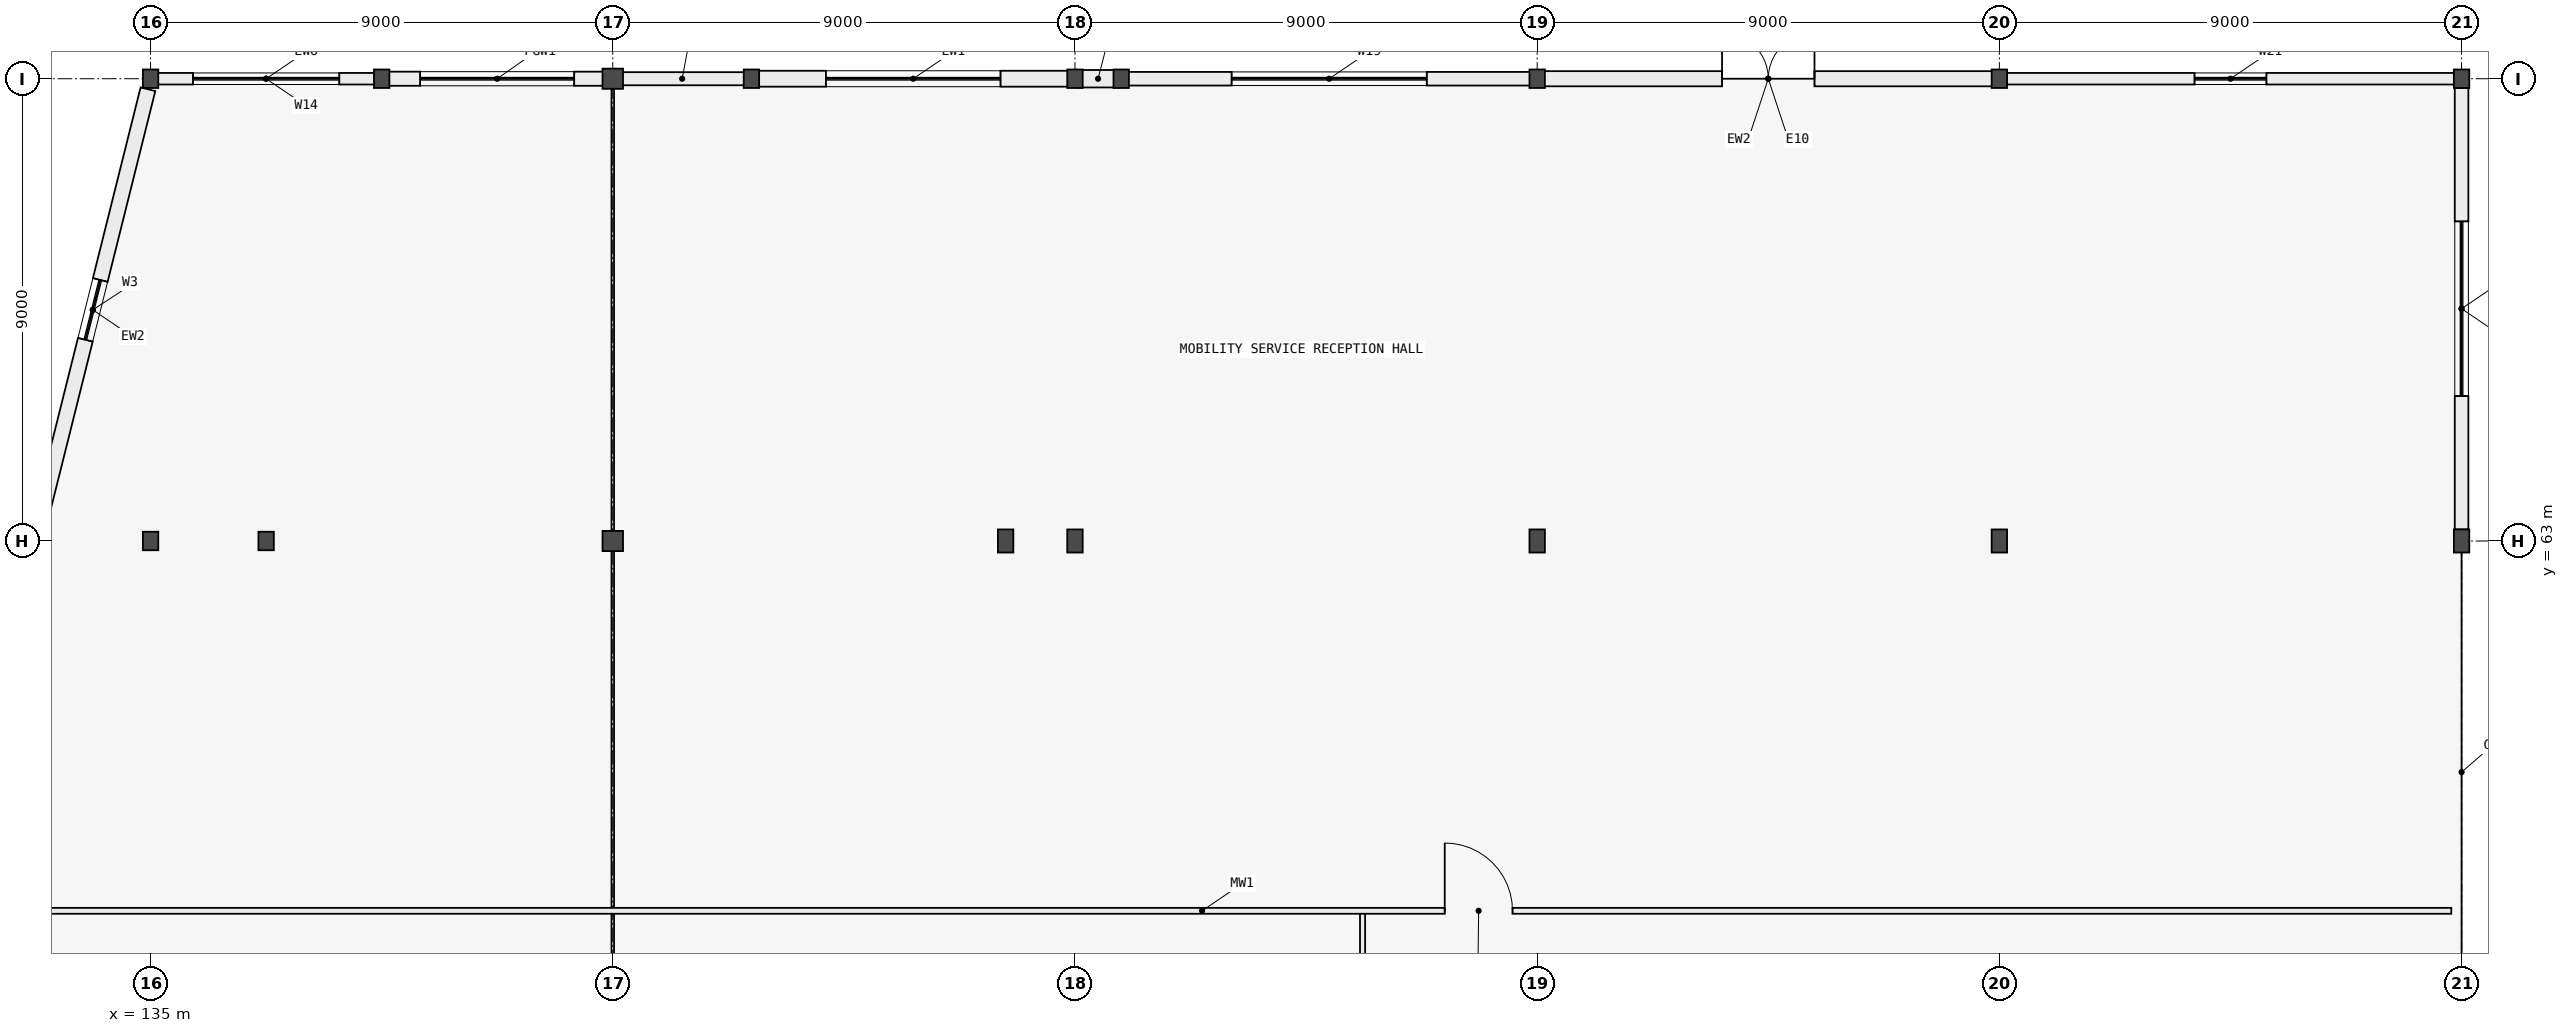
"""IFC4 building model, lengths in metres.
Left out: names, types, materials, properties, quantities, classifications, styles, units other than length and angle.
Written with IfcOpenShell. Run it as: python <this file> out.ifc"""

import sys

from ifc_helpers import new_model, si_unit, direction, frame, frame_2d, origin, origin_2d, place, context, subcontext, project, spatial, rectangle, i_section, extrude, element, fill, save


model = new_model("IFC4")
c1 = context("Model", 3, precision=1e-05, world=origin(), true_north=direction((0.0, 1.0)))
c2 = subcontext(c1, "Body", "Model", "MODEL_VIEW")
j1 = project(units=[si_unit("LENGTHUNIT", "METRE"), si_unit("PLANEANGLEUNIT", "RADIAN")], contexts=[c1])
p1 = place(None, origin())
s1 = spatial("IfcSite", under=j1, at=p1, CompositionType="ELEMENT")
p2 = place(p1, origin())
s2 = spatial("IfcBuilding", under=s1, at=p2, CompositionType="ELEMENT")
p3 = place(p2, origin())
s3 = spatial("IfcBuildingStorey", under=s2, at=p3, CompositionType="ELEMENT", Elevation=0.0)
for number, where, z_axis, x_axis in (
    (1, (135.0, 63.0, 0.0), (0.0, 0.0, 1.0), (1.0, 0.0, 0.0)),
    (2, (137.25, 63.0, 0.0), (0.0, 0.0, 1.0), (1.0, 0.0, 0.0)),
):
    element("IfcColumn", number, at=place(p3, frame(where, z_axis=z_axis, x_axis=x_axis)), inside=s3, PredefinedType="COLUMN", context=c2, shape_type="SweptSolid", body=[
        extrude(i_section(OverallWidth=0.3, OverallDepth=0.36, WebThickness=0.012, FlangeThickness=0.022, FilletRadius=0.027, at=origin_2d()), origin(), (0.0, 0.0, 1.0), 4.2),
    ])
p4 = place(p3, frame((144.0, 63.0, 0.0), z_axis=(0.0, 0.0, 1.0), x_axis=(1.0, 0.0, 0.0)))
e3 = element("IfcColumn", 3, at=p4, inside=s3, PredefinedType="COLUMN", context=c2, shape_type="SweptSolid", body=[
    extrude(i_section(OverallWidth=0.399, OverallDepth=0.393, WebThickness=0.018, FlangeThickness=0.028, FilletRadius=0.015, at=origin_2d()), origin(), (0.0, 0.0, 1.0), 4.2),
])
for number, where, z_axis, x_axis in (
    (4, (151.65, 63.0, 0.0), (0.0, 0.0, 1.0), (1.0, 0.0, 0.0)),
    (5, (153.0, 63.0, 0.0), (0.0, 0.0, 1.0), (1.0, 0.0, 0.0)),
    (6, (162.0, 63.0, 0.0), (0.0, 0.0, 1.0), (1.0, 0.0, 0.0)),
    (7, (171.0, 63.0, 0.0), (0.0, 0.0, 1.0), (1.0, 0.0, 0.0)),
    (8, (180.0, 63.0, 0.0), (0.0, 0.0, 1.0), (1.0, 0.0, 0.0)),
):
    element("IfcColumn", number, at=place(p3, frame(where, z_axis=z_axis, x_axis=x_axis)), inside=s3, PredefinedType="COLUMN", context=c2, shape_type="SweptSolid", body=[
        extrude(i_section(OverallWidth=0.3, OverallDepth=0.45, WebThickness=0.014, FlangeThickness=0.026, FilletRadius=0.027, at=origin_2d()), origin(), (0.0, 0.0, 1.0), 4.2),
    ])
for number, where, z_axis, x_axis in (
    (9, (135.0, 72.0, 0.0), (0.0, 0.0, 1.0), (1.0, 0.0, 0.0)),
    (10, (139.5, 72.0, 0.0), (0.0, 0.0, 1.0), (1.0, 0.0, 0.0)),
):
    element("IfcColumn", number, at=place(p3, frame(where, z_axis=z_axis, x_axis=x_axis)), inside=s3, PredefinedType="COLUMN", context=c2, shape_type="SweptSolid", body=[
        extrude(i_section(OverallWidth=0.3, OverallDepth=0.36, WebThickness=0.012, FlangeThickness=0.022, FilletRadius=0.027, at=origin_2d()), origin(), (0.0, 0.0, 1.0), 4.2),
    ])
p5 = place(p3, frame((144.0, 72.0, 0.0), z_axis=(0.0, 0.0, 1.0), x_axis=(1.0, 0.0, 0.0)))
e11 = element("IfcColumn", 11, at=p5, inside=s3, PredefinedType="COLUMN", context=c2, shape_type="SweptSolid", body=[
    extrude(i_section(OverallWidth=0.399, OverallDepth=0.393, WebThickness=0.018, FlangeThickness=0.028, FilletRadius=0.015, at=origin_2d()), origin(), (0.0, 0.0, 1.0), 4.2),
])
for number, where, z_axis, x_axis in (
    (12, (146.7, 72.0, 0.0), (0.0, 0.0, 1.0), (1.0, 0.0, 0.0)),
    (13, (153.0, 72.0, 0.0), (0.0, 0.0, 1.0), (1.0, 0.0, 0.0)),
    (14, (153.9, 72.0, 0.0), (0.0, 0.0, 1.0), (1.0, 0.0, 0.0)),
    (15, (162.0, 72.0, 0.0), (0.0, 0.0, 1.0), (1.0, 0.0, 0.0)),
    (16, (171.0, 72.0, 0.0), (0.0, 0.0, 1.0), (1.0, 0.0, 0.0)),
    (17, (180.0, 72.0, 0.0), (0.0, 0.0, 1.0), (1.0, 0.0, 0.0)),
):
    element("IfcColumn", number, at=place(p3, frame(where, z_axis=z_axis, x_axis=x_axis)), inside=s3, PredefinedType="COLUMN", context=c2, shape_type="SweptSolid", body=[
        extrude(i_section(OverallWidth=0.3, OverallDepth=0.36, WebThickness=0.012, FlangeThickness=0.022, FilletRadius=0.027, at=origin_2d()), origin(), (0.0, 0.0, 1.0), 4.2),
    ])
p6 = place(p3, frame((180.0, 63.225, 0.0), z_axis=(0.0, 0.0, 1.0), x_axis=(0.0, 1.0, 0.0)))
e18 = element("IfcWall", 18, at=p6, inside=s3, PredefinedType="STANDARD", context=c2, shape_type="SweptSolid", body=[
    extrude(rectangle(XDim=8.595, YDim=0.265, at=frame_2d((4.297, 0.0))), origin(), (0.0, 0.0, 1.0), 3.625),
])
p7 = place(p6, frame((2.597, 0.0, 0.95)))
e19 = element("IfcOpeningElement", 19, at=p7, cuts=e18, PredefinedType="OPENING", context=c2, shape_type="SweptSolid", body=[
    extrude(rectangle(XDim=3.4, YDim=1.55, at=frame_2d((1.7, 0.775))), frame((0.0, 0.143, 0.0), z_axis=(0.0, -1.0, 0.0), x_axis=(1.0, 0.0, 0.0)), (0.0, 0.0, 1.0), 0.285),
])
p8 = place(p3, frame((135.006, 72.0, 0.0), z_axis=(0.0, 0.0, 1.0), x_axis=(1.0, 0.0, 0.0)))
e20 = element("IfcWall", 20, at=p8, inside=s3, PredefinedType="STANDARD", context=c2, shape_type="SweptSolid", body=[
    extrude(rectangle(XDim=4.488, YDim=0.225, at=frame_2d((2.244, 0.0))), origin(), (0.0, 0.0, 1.0), 3.655),
])
p9 = place(p8, frame((0.819, 0.0, 0.95)))
e21 = element("IfcOpeningElement", 21, at=p9, cuts=e20, PredefinedType="OPENING", context=c2, shape_type="SweptSolid", body=[
    extrude(rectangle(XDim=2.85, YDim=1.7, at=frame_2d((1.425, 0.85))), frame((0.0, 0.123, 0.0), z_axis=(0.0, -1.0, 0.0), x_axis=(1.0, 0.0, 0.0)), (0.0, 0.0, 1.0), 0.245),
])
p10 = place(p3, frame((139.506, 72.0, 0.0), z_axis=(0.0, 0.0, 1.0), x_axis=(1.0, 0.0, 0.0)))
e22 = element("IfcWall", 22, at=p10, inside=s3, PredefinedType="POLYGONAL", context=c2, shape_type="SweptSolid", body=[
    extrude(rectangle(XDim=4.485, YDim=0.275, at=frame_2d((2.243, 0.0))), origin(), (0.0, 0.0, 1.0), 3.655),
])
p11 = place(p10, frame((0.742, 0.0, 0.95)))
e23 = element("IfcOpeningElement", 23, at=p11, cuts=e22, PredefinedType="OPENING", context=c2, shape_type="SweptSolid", body=[
    extrude(rectangle(XDim=3.0, YDim=1.8, at=frame_2d((1.5, 0.9))), frame((0.0, 0.147, 0.0), z_axis=(0.0, -1.0, 0.0), x_axis=(1.0, 0.0, 0.0)), (0.0, 0.0, 1.0), 0.295),
])
p12 = place(p3, frame((144.009, 72.0, 0.0), z_axis=(0.0, 0.0, 1.0), x_axis=(1.0, 0.0, 0.0)))
e24 = element("IfcWall", 24, at=p12, inside=s3, PredefinedType="POLYGONAL", context=c2, shape_type="SweptSolid", body=[
    extrude(rectangle(XDim=2.685, YDim=0.255, at=frame_2d((1.342, 0.0))), origin(), (0.0, 0.0, 1.0), 3.655),
])
p13 = place(p3, frame((146.706, 72.0, 0.0), z_axis=(0.0, 0.0, 1.0), x_axis=(1.0, 0.0, 0.0)))
e25 = element("IfcWall", 25, at=p13, inside=s3, PredefinedType="STANDARD", context=c2, shape_type="SweptSolid", body=[
    extrude(rectangle(XDim=6.288, YDim=0.31, at=frame_2d((3.144, 0.0))), origin(), (0.0, 0.0, 1.0), 3.655),
])
p14 = place(p13, frame((1.444, 0.0, 0.95)))
e26 = element("IfcOpeningElement", 26, at=p14, cuts=e25, PredefinedType="OPENING", context=c2, shape_type="SweptSolid", body=[
    extrude(rectangle(XDim=3.4, YDim=1.55, at=frame_2d((1.7, 0.775))), frame((0.0, 0.165, 0.0), z_axis=(0.0, -1.0, 0.0), x_axis=(1.0, 0.0, 0.0)), (0.0, 0.0, 1.0), 0.33),
])
p15 = place(p3, frame((153.006, 72.0, 0.0), z_axis=(0.0, 0.0, 1.0), x_axis=(1.0, 0.0, 0.0)))
e27 = element("IfcWall", 27, at=p15, inside=s3, PredefinedType="STANDARD", context=c2, shape_type="SweptSolid", body=[
    extrude(rectangle(XDim=0.888, YDim=0.34, at=frame_2d((0.444, 0.0))), origin(), (0.0, 0.0, 1.0), 3.655),
])
p16 = place(p3, frame((153.906, 72.0, 0.0), z_axis=(0.0, 0.0, 1.0), x_axis=(1.0, 0.0, 0.0)))
e28 = element("IfcWall", 28, at=p16, inside=s3, PredefinedType="STANDARD", context=c2, shape_type="SweptSolid", body=[
    extrude(rectangle(XDim=8.088, YDim=0.265, at=frame_2d((4.044, 0.0))), origin(), (0.0, 0.0, 1.0), 3.625),
])
p17 = place(p16, frame((2.144, 0.0, 0.95)))
e29 = element("IfcOpeningElement", 29, at=p17, cuts=e28, PredefinedType="OPENING", context=c2, shape_type="SweptSolid", body=[
    extrude(rectangle(XDim=3.8, YDim=1.4, at=frame_2d((1.9, 0.7))), frame((0.0, 0.143, 0.0), z_axis=(0.0, -1.0, 0.0), x_axis=(1.0, 0.0, 0.0)), (0.0, 0.0, 1.0), 0.285),
])
p18 = place(p3, frame((162.006, 72.0, 0.0), z_axis=(0.0, 0.0, 1.0), x_axis=(1.0, 0.0, 0.0)))
e30 = element("IfcWall", 30, at=p18, inside=s3, PredefinedType="STANDARD", context=c2, shape_type="SweptSolid", body=[
    extrude(rectangle(XDim=8.988, YDim=0.295, at=frame_2d((4.494, 0.0))), origin(), (0.0, 0.0, 1.0), 3.625),
])
p19 = place(p18, frame((3.594, 0.0, 0.0)))
e31 = element("IfcOpeningElement", 31, at=p19, cuts=e30, PredefinedType="OPENING", context=c2, shape_type="SweptSolid", body=[
    extrude(rectangle(XDim=1.8, YDim=2.2, at=frame_2d((0.9, 1.1))), frame((0.0, 0.157, 0.0), z_axis=(0.0, -1.0, 0.0), x_axis=(1.0, 0.0, 0.0)), (0.0, 0.0, 1.0), 0.315),
])
p20 = place(p3, frame((171.006, 72.0, 0.0), z_axis=(0.0, 0.0, 1.0), x_axis=(1.0, 0.0, 0.0)))
e32 = element("IfcWall", 32, at=p20, inside=s3, PredefinedType="STANDARD", context=c2, shape_type="SweptSolid", body=[
    extrude(rectangle(XDim=8.988, YDim=0.225, at=frame_2d((4.494, 0.0))), origin(), (0.0, 0.0, 1.0), 3.625),
])
p21 = place(p20, frame((3.794, 0.0, 0.95)))
e33 = element("IfcOpeningElement", 33, at=p21, cuts=e32, PredefinedType="OPENING", context=c2, shape_type="SweptSolid", body=[
    extrude(rectangle(XDim=1.4, YDim=2.0, at=frame_2d((0.7, 1.0))), frame((0.0, 0.123, 0.0), z_axis=(0.0, -1.0, 0.0), x_axis=(1.0, 0.0, 0.0)), (0.0, 0.0, 1.0), 0.245),
])
p22 = place(p3, frame((132.801, 63.205, 0.0), z_axis=(0.0, 0.0, 1.0), x_axis=(0.242509676291, 0.970148986963, 0.0)))
e34 = element("IfcWall", 34, at=p22, inside=s3, PredefinedType="STANDARD", context=c2, shape_type="SweptSolid", body=[
    extrude(rectangle(XDim=8.855, YDim=0.295, at=frame_2d((4.428, 0.0))), origin(), (0.0, 0.0, 1.0), 3.325),
])
p23 = place(p22, frame((3.827, 0.0, 0.95)))
e35 = element("IfcOpeningElement", 35, at=p23, cuts=e34, PredefinedType="OPENING", context=c2, shape_type="SweptSolid", body=[
    extrude(rectangle(XDim=1.2, YDim=1.35, at=frame_2d((0.6, 0.675))), frame((0.0, 0.157, 0.0), z_axis=(0.0, -1.0, 0.0), x_axis=(1.0, 0.0, 0.0)), (0.0, 0.0, 1.0), 0.315),
])
p24 = place(p3, frame((158.6, 36.2, 0.0), z_axis=(0.0, 0.0, 1.0), x_axis=(0.0, 1.0, 0.0)))
e36 = element("IfcWall", 36, at=p24, inside=s3, PredefinedType="PARTITIONING", context=c2, shape_type="SweptSolid", body=[
    extrude(rectangle(XDim=19.6, YDim=0.1, at=frame_2d((9.8, 0.0))), origin(), (0.0, 0.0, 1.0), 3.655),
])
p25 = place(p24, frame((9.2, 0.0, 0.0)))
e37 = element("IfcOpeningElement", 37, at=p25, cuts=e36, PredefinedType="OPENING", context=c2, shape_type="SweptSolid", body=[
    extrude(rectangle(XDim=1.22, YDim=2.18, at=frame_2d((0.61, 1.09))), frame((0.0, 0.06, 0.0), z_axis=(0.0, -1.0, 0.0), x_axis=(1.0, 0.0, 0.0)), (0.0, 0.0, 1.0), 0.12),
])
p26 = place(p3, frame((131.15, 55.8, 0.0), z_axis=(0.0, 0.0, 1.0), x_axis=(1.0, 0.0, 0.0)))
e38 = element("IfcWall", 38, at=p26, inside=s3, PredefinedType="MOVABLE", context=c2, shape_type="SweptSolid", body=[
    extrude(rectangle(XDim=48.65, YDim=0.115, at=frame_2d((24.325, 0.0))), origin(), (0.0, 0.0, 1.0), 3.95),
])
p27 = place(p26, frame((29.05, 0.0, 0.0)))
e39 = element("IfcOpeningElement", 39, at=p27, cuts=e38, PredefinedType="OPENING", context=c2, shape_type="SweptSolid", body=[
    extrude(rectangle(XDim=1.32, YDim=2.2, at=frame_2d((0.66, 1.1))), frame((0.0, 0.067, 0.0), z_axis=(0.0, -1.0, 0.0), x_axis=(1.0, 0.0, 0.0)), (0.0, 0.0, 1.0), 0.135),
])
p28 = place(p7, origin())
e40 = element("IfcWindow", 40, at=p28, inside=s3, PartitioningType="SINGLE_PANEL", PredefinedType="WINDOW", context=c2, shape_type="SweptSolid", body=[
    extrude(rectangle(XDim=3.4, YDim=1.55, at=frame_2d((1.7, 0.775))), frame((0.0, 0.03, 0.0), z_axis=(0.0, -1.0, 0.0), x_axis=(1.0, 0.0, 0.0)), (0.0, 0.0, 1.0), 0.06),
])
fill(e19, e40)
p29 = place(p9, origin())
e41 = element("IfcWindow", 41, at=p29, inside=s3, PartitioningType="SINGLE_PANEL", PredefinedType="WINDOW", context=c2, shape_type="SweptSolid", body=[
    extrude(rectangle(XDim=2.85, YDim=1.7, at=frame_2d((1.425, 0.85))), frame((0.0, 0.03, 0.0), z_axis=(0.0, -1.0, 0.0), x_axis=(1.0, 0.0, 0.0)), (0.0, 0.0, 1.0), 0.06),
])
fill(e21, e41)
p30 = place(p11, origin())
e42 = element("IfcWindow", 42, at=p30, inside=s3, PartitioningType="SINGLE_PANEL", PredefinedType="WINDOW", context=c2, shape_type="SweptSolid", body=[
    extrude(rectangle(XDim=3.0, YDim=1.8, at=frame_2d((1.5, 0.9))), frame((0.0, 0.03, 0.0), z_axis=(0.0, -1.0, 0.0), x_axis=(1.0, 0.0, 0.0)), (0.0, 0.0, 1.0), 0.06),
])
fill(e23, e42)
p31 = place(p14, origin())
e43 = element("IfcWindow", 43, at=p31, inside=s3, PartitioningType="SINGLE_PANEL", PredefinedType="WINDOW", context=c2, shape_type="SweptSolid", body=[
    extrude(rectangle(XDim=3.4, YDim=1.55, at=frame_2d((1.7, 0.775))), frame((0.0, 0.03, 0.0), z_axis=(0.0, -1.0, 0.0), x_axis=(1.0, 0.0, 0.0)), (0.0, 0.0, 1.0), 0.06),
])
fill(e26, e43)
p32 = place(p17, origin())
e44 = element("IfcWindow", 44, at=p32, inside=s3, PartitioningType="SINGLE_PANEL", PredefinedType="WINDOW", context=c2, shape_type="SweptSolid", body=[
    extrude(rectangle(XDim=3.8, YDim=1.4, at=frame_2d((1.9, 0.7))), frame((0.0, 0.03, 0.0), z_axis=(0.0, -1.0, 0.0), x_axis=(1.0, 0.0, 0.0)), (0.0, 0.0, 1.0), 0.06),
])
fill(e29, e44)
p33 = place(p19, origin())
e45 = element("IfcDoor", 45, at=p33, inside=s3, OperationType="DOUBLE_DOOR_SINGLE_SWING", PredefinedType="DOOR", context=c2, shape_type="SweptSolid", body=[
    extrude(rectangle(XDim=1.8, YDim=2.2, at=frame_2d((0.9, 1.1))), frame((0.0, 0.025, 0.0), z_axis=(0.0, -1.0, 0.0), x_axis=(1.0, 0.0, 0.0)), (0.0, 0.0, 1.0), 0.05),
])
fill(e31, e45)
p34 = place(p21, origin())
e46 = element("IfcWindow", 46, at=p34, inside=s3, PartitioningType="SINGLE_PANEL", PredefinedType="WINDOW", context=c2, shape_type="SweptSolid", body=[
    extrude(rectangle(XDim=1.4, YDim=2.0, at=frame_2d((0.7, 1.0))), frame((0.0, 0.03, 0.0), z_axis=(0.0, -1.0, 0.0), x_axis=(1.0, 0.0, 0.0)), (0.0, 0.0, 1.0), 0.06),
])
fill(e33, e46)
p35 = place(p23, origin())
e47 = element("IfcWindow", 47, at=p35, inside=s3, PartitioningType="SINGLE_PANEL", PredefinedType="WINDOW", context=c2, shape_type="SweptSolid", body=[
    extrude(rectangle(XDim=1.2, YDim=1.35, at=frame_2d((0.6, 0.675))), frame((0.0, 0.03, 0.0), z_axis=(0.0, -1.0, 0.0), x_axis=(1.0, 0.0, 0.0)), (0.0, 0.0, 1.0), 0.06),
])
fill(e35, e47)
p36 = place(p27, origin())
e48 = element("IfcDoor", 48, at=p36, inside=s3, OperationType="SINGLE_SWING_LEFT", PredefinedType="DOOR", context=c2, shape_type="SweptSolid", body=[
    extrude(rectangle(XDim=1.32, YDim=2.2, at=frame_2d((0.66, 1.1))), frame((0.0, 0.025, 0.0), z_axis=(0.0, -1.0, 0.0), x_axis=(1.0, 0.0, 0.0)), (0.0, 0.0, 1.0), 0.05),
])
fill(e39, e48)
save(model, sys.argv[1])
